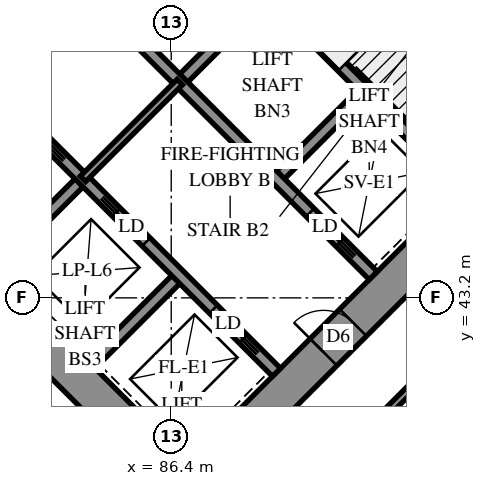
"""IFC4 building model, lengths in metres.
Left out: names, types, materials, properties, quantities, classifications, styles, units other than length and angle.
Written with IfcOpenShell. Run it as: python <this file> out.ifc"""

import sys

from ifc_helpers import new_model, si_unit, direction, frame, frame_2d, origin, place, context, subcontext, project, spatial, polyline, rectangle, outline, extrude, element, fill, save


model = new_model("IFC4")
c1 = context("Model", 3, precision=1e-05, world=origin(), true_north=direction((0.0, 1.0)))
c2 = subcontext(c1, "Body", "Model", "MODEL_VIEW")
j1 = project(units=[si_unit("LENGTHUNIT", "METRE"), si_unit("PLANEANGLEUNIT", "RADIAN")], contexts=[c1])
p1 = place(None, origin())
s1 = spatial("IfcSite", under=j1, at=p1, CompositionType="ELEMENT")
p2 = place(p1, origin())
s2 = spatial("IfcBuilding", under=s1, at=p2, CompositionType="ELEMENT")
p3 = place(p2, frame((0.0, 0.0, 14.4)))
s3 = spatial("IfcBuildingStorey", under=s2, at=p3, CompositionType="ELEMENT", Elevation=14.4)
p4 = place(p3, frame((75.594, 49.443, -0.4), z_axis=(0.0, 0.0, 1.0), x_axis=(0.7071037324, -0.70710983, 0.0)))
e1 = element("IfcWall", 1, at=p4, inside=s3, PredefinedType="SHEAR", context=c2, shape_type="SweptSolid", body=[
    extrude(rectangle(XDim=16.4, YDim=1.0, at=frame_2d((8.2, 0.0))), origin(), (0.0, 0.0, 1.0), 3.5),
])
p5 = place(p3, frame((86.483, 60.333, -0.4), z_axis=(0.0, 0.0, 1.0), x_axis=(0.70710983, -0.7071037324, 0.0)))
e2 = element("IfcWall", 2, at=p5, inside=s3, PredefinedType="SHEAR", context=c2, shape_type="SweptSolid", body=[
    extrude(rectangle(XDim=16.4, YDim=1.0, at=frame_2d((8.2, 0.0))), origin(), (0.0, 0.0, 1.0), 3.5),
])
p6 = place(p5, frame((11.0, 0.0, 0.4)))
e3 = element("IfcOpeningElement", 3, at=p6, cuts=e2, PredefinedType="OPENING", context=c2, shape_type="SweptSolid", body=[
    extrude(rectangle(XDim=0.8, YDim=2.1, at=frame_2d((0.4, 1.05))), frame((0.0, 0.51, 0.0), z_axis=(0.0, -1.0, 0.0), x_axis=(1.0, 0.0, 0.0)), (0.0, 0.0, 1.0), 1.02),
])
p7 = place(p3, frame((76.301, 49.443, -0.4), z_axis=(0.0, 0.0, 1.0), x_axis=(0.7071067812, 0.7071067812, 0.0)))
e4 = element("IfcWall", 4, at=p7, inside=s3, PredefinedType="SHEAR", context=c2, shape_type="SweptSolid", body=[
    extrude(rectangle(XDim=14.4, YDim=1.0, at=frame_2d((7.2, 0.0))), origin(), (0.0, 0.0, 1.0), 3.5),
])
p8 = place(p7, frame((4.55, 0.0, 0.4)))
e5 = element("IfcOpeningElement", 5, at=p8, cuts=e4, PredefinedType="OPENING", context=c2, shape_type="SweptSolid", body=[
    extrude(rectangle(XDim=1.1, YDim=2.1, at=frame_2d((0.55, 1.05))), frame((0.0, 0.51, 0.0), z_axis=(0.0, -1.0, 0.0), x_axis=(1.0, 0.0, 0.0)), (0.0, 0.0, 1.0), 1.02),
])
p9 = place(p7, frame((11.35, 0.0, 0.4)))
e6 = element("IfcOpeningElement", 6, at=p9, cuts=e4, PredefinedType="OPENING", context=c2, shape_type="SweptSolid", body=[
    extrude(rectangle(XDim=1.1, YDim=2.1, at=frame_2d((0.55, 1.05))), frame((0.0, 0.51, 0.0), z_axis=(0.0, -1.0, 0.0), x_axis=(1.0, 0.0, 0.0)), (0.0, 0.0, 1.0), 1.02),
])
p10 = place(p3, frame((87.19, 38.554, -0.4), z_axis=(0.0, 0.0, 1.0), x_axis=(0.707103309, 0.7071102534, 0.0)))
e7 = element("IfcWall", 7, at=p10, inside=s3, PredefinedType="SHEAR", context=c2, shape_type="SweptSolid", body=[
    extrude(rectangle(XDim=14.4, YDim=1.0, at=frame_2d((7.2, 0.0))), origin(), (0.0, 0.0, 1.0), 3.5),
])
p11 = place(p10, frame((4.55, 0.0, 0.4)))
e8 = element("IfcOpeningElement", 8, at=p11, cuts=e7, PredefinedType="OPENING", context=c2, shape_type="SweptSolid", body=[
    extrude(rectangle(XDim=1.1, YDim=2.1, at=frame_2d((0.55, 1.05))), frame((0.0, 0.51, 0.0), z_axis=(0.0, -1.0, 0.0), x_axis=(1.0, 0.0, 0.0)), (0.0, 0.0, 1.0), 1.02),
])
p12 = place(p10, frame((11.35, 0.0, 0.4)))
e9 = element("IfcOpeningElement", 9, at=p12, cuts=e7, PredefinedType="OPENING", context=c2, shape_type="SweptSolid", body=[
    extrude(rectangle(XDim=1.1, YDim=2.1, at=frame_2d((0.55, 1.05))), frame((0.0, 0.51, 0.0), z_axis=(0.0, -1.0, 0.0), x_axis=(1.0, 0.0, 0.0)), (0.0, 0.0, 1.0), 1.02),
])
p13 = place(p3, frame((81.746, 43.999, 0.0), z_axis=(0.0, 0.0, 1.0), x_axis=(0.7071067812, 0.7071067812, 0.0)))
e10 = element("IfcWall", 10, at=p13, inside=s3, PredefinedType="SOLIDWALL", context=c2, shape_type="SweptSolid", body=[
    extrude(rectangle(XDim=3.3, YDim=0.3, at=frame_2d((1.65, 0.0))), origin(), (0.0, 0.0, 1.0), 3.8),
])
p14 = place(p3, frame((86.625, 48.878, 0.0), z_axis=(0.0, 0.0, 1.0), x_axis=(0.7071067812, 0.7071067812, 0.0)))
e11 = element("IfcWall", 11, at=p14, inside=s3, PredefinedType="SOLIDWALL", context=c2, shape_type="SweptSolid", body=[
    extrude(rectangle(XDim=3.3, YDim=0.3, at=frame_2d((1.65, 0.0))), origin(), (0.0, 0.0, 1.0), 3.8),
])
p15 = place(p3, frame((84.291, 41.453, 0.0), z_axis=(0.0, 0.0, 1.0), x_axis=(0.7071067812, 0.7071067812, 0.0)))
e12 = element("IfcWall", 12, at=p15, inside=s3, PredefinedType="SOLIDWALL", context=c2, shape_type="SweptSolid", body=[
    extrude(rectangle(XDim=3.3, YDim=0.3, at=frame_2d((1.65, 0.0))), origin(), (0.0, 0.0, 1.0), 3.8),
])
p16 = place(p3, frame((89.17, 46.332, 0.0), z_axis=(0.0, 0.0, 1.0), x_axis=(0.7071067812, 0.7071067812, 0.0)))
e13 = element("IfcWall", 13, at=p16, inside=s3, PredefinedType="SOLIDWALL", context=c2, shape_type="SweptSolid", body=[
    extrude(rectangle(XDim=3.3, YDim=0.3, at=frame_2d((1.65, 0.0))), origin(), (0.0, 0.0, 1.0), 3.8),
])
p17 = place(p3, frame((78.988, 51.423, 0.0), z_axis=(0.0, 0.0, 1.0), x_axis=(0.7071067812, -0.7071067812, 0.0)))
e14 = element("IfcWall", 14, at=p17, inside=s3, PredefinedType="SOLIDWALL", context=c2, shape_type="SweptSolid", body=[
    extrude(rectangle(XDim=14.4, YDim=0.3, at=frame_2d((7.2, 0.0))), origin(), (0.0, 0.0, 1.0), 3.8),
])
p18 = place(p17, frame((1.25, 0.0, 0.0)))
e15 = element("IfcOpeningElement", 15, at=p18, cuts=e14, PredefinedType="OPENING", context=c2, shape_type="SweptSolid", body=[
    extrude(rectangle(XDim=1.1, YDim=2.1, at=frame_2d((0.55, 1.05))), frame((0.0, 0.16, 0.0), z_axis=(0.0, -1.0, 0.0), x_axis=(1.0, 0.0, 0.0)), (0.0, 0.0, 1.0), 0.32),
])
p19 = place(p17, frame((4.85, 0.0, 0.0)))
e16 = element("IfcOpeningElement", 16, at=p19, cuts=e14, PredefinedType="OPENING", context=c2, shape_type="SweptSolid", body=[
    extrude(rectangle(XDim=1.1, YDim=2.1, at=frame_2d((0.55, 1.05))), frame((0.0, 0.16, 0.0), z_axis=(0.0, -1.0, 0.0), x_axis=(1.0, 0.0, 0.0)), (0.0, 0.0, 1.0), 0.32),
])
p20 = place(p17, frame((8.45, 0.0, 0.0)))
e17 = element("IfcOpeningElement", 17, at=p20, cuts=e14, PredefinedType="OPENING", context=c2, shape_type="SweptSolid", body=[
    extrude(rectangle(XDim=1.1, YDim=2.1, at=frame_2d((0.55, 1.05))), frame((0.0, 0.16, 0.0), z_axis=(0.0, -1.0, 0.0), x_axis=(1.0, 0.0, 0.0)), (0.0, 0.0, 1.0), 0.32),
])
p21 = place(p17, frame((12.05, 0.0, 0.0)))
e18 = element("IfcOpeningElement", 18, at=p21, cuts=e14, PredefinedType="OPENING", context=c2, shape_type="SweptSolid", body=[
    extrude(rectangle(XDim=1.1, YDim=2.1, at=frame_2d((0.55, 1.05))), frame((0.0, 0.16, 0.0), z_axis=(0.0, -1.0, 0.0), x_axis=(1.0, 0.0, 0.0)), (0.0, 0.0, 1.0), 0.32),
])
p22 = place(p3, frame((81.534, 53.969, 0.0), z_axis=(0.0, 0.0, 1.0), x_axis=(0.707103309, -0.7071102534, 0.0)))
e19 = element("IfcWall", 19, at=p22, inside=s3, PredefinedType="SOLIDWALL", context=c2, shape_type="SweptSolid", body=[
    extrude(rectangle(XDim=14.4, YDim=0.3, at=frame_2d((7.2, 0.0))), origin(), (0.0, 0.0, 1.0), 3.8),
])
p23 = place(p22, frame((12.05, 0.0, 0.0)))
e20 = element("IfcOpeningElement", 20, at=p23, cuts=e19, PredefinedType="OPENING", context=c2, shape_type="SweptSolid", body=[
    extrude(rectangle(XDim=1.1, YDim=2.1, at=frame_2d((0.55, 1.05))), frame((0.0, 0.16, 0.0), z_axis=(0.0, -1.0, 0.0), x_axis=(1.0, 0.0, 0.0)), (0.0, 0.0, 1.0), 0.32),
])
p24 = place(p3, frame((88.958, 51.211, 0.0), z_axis=(0.0, 0.0, 1.0), x_axis=(0.7070998367, -0.7071137256, 0.0)))
e21 = element("IfcWall", 21, at=p24, inside=s3, PredefinedType="SOLIDWALL", context=c2, shape_type="SweptSolid", body=[
    extrude(rectangle(XDim=7.2, YDim=0.3, at=frame_2d((3.6, 0.0))), origin(), (0.0, 0.0, 1.0), 3.8),
])
p25 = place(p3, frame((117.843, 34.665, 0.0), z_axis=(0.0, 0.0, 1.0), x_axis=(-0.7071067812, 0.7071067812, 0.0)))
e22 = element("IfcWall", 22, at=p25, inside=s3, PredefinedType="SOLIDWALL", context=c2, shape_type="SweptSolid", body=[
    extrude(outline(polyline([(-0.275, -0.275), (54.222, -0.275), (53.994, 0.275), (0.275, 0.275), (-0.275, -0.275)])), origin(), (0.0, 0.0, 1.0), 3.8),
])
p26 = place(p25, frame((0.8, 0.0, 0.7)))
e23 = element("IfcOpeningElement", 23, at=p26, cuts=e22, PredefinedType="OPENING", context=c2, shape_type="SweptSolid", body=[
    extrude(rectangle(XDim=1.8, YDim=2.6, at=frame_2d((0.9, 1.3))), frame((0.0, 0.285, 0.0), z_axis=(0.0, -1.0, 0.0), x_axis=(1.0, 0.0, 0.0)), (0.0, 0.0, 1.0), 0.57),
])
p27 = place(p25, frame((4.225, 0.0, 0.7)))
e24 = element("IfcOpeningElement", 24, at=p27, cuts=e22, PredefinedType="OPENING", context=c2, shape_type="SweptSolid", body=[
    extrude(rectangle(XDim=1.8, YDim=2.6, at=frame_2d((0.9, 1.3))), frame((0.0, 0.285, 0.0), z_axis=(0.0, -1.0, 0.0), x_axis=(1.0, 0.0, 0.0)), (0.0, 0.0, 1.0), 0.57),
])
p28 = place(p25, frame((7.825, 0.0, 0.7)))
e25 = element("IfcOpeningElement", 25, at=p28, cuts=e22, PredefinedType="OPENING", context=c2, shape_type="SweptSolid", body=[
    extrude(rectangle(XDim=1.8, YDim=2.6, at=frame_2d((0.9, 1.3))), frame((0.0, 0.285, 0.0), z_axis=(0.0, -1.0, 0.0), x_axis=(1.0, 0.0, 0.0)), (0.0, 0.0, 1.0), 0.57),
])
p29 = place(p25, frame((11.425, 0.0, 0.7)))
e26 = element("IfcOpeningElement", 26, at=p29, cuts=e22, PredefinedType="OPENING", context=c2, shape_type="SweptSolid", body=[
    extrude(rectangle(XDim=1.8, YDim=2.6, at=frame_2d((0.9, 1.3))), frame((0.0, 0.285, 0.0), z_axis=(0.0, -1.0, 0.0), x_axis=(1.0, 0.0, 0.0)), (0.0, 0.0, 1.0), 0.57),
])
p30 = place(p25, frame((15.025, 0.0, 0.7)))
e27 = element("IfcOpeningElement", 27, at=p30, cuts=e22, PredefinedType="OPENING", context=c2, shape_type="SweptSolid", body=[
    extrude(rectangle(XDim=1.8, YDim=2.6, at=frame_2d((0.9, 1.3))), frame((0.0, 0.285, 0.0), z_axis=(0.0, -1.0, 0.0), x_axis=(1.0, 0.0, 0.0)), (0.0, 0.0, 1.0), 0.57),
])
p31 = place(p25, frame((18.625, 0.0, 0.7)))
e28 = element("IfcOpeningElement", 28, at=p31, cuts=e22, PredefinedType="OPENING", context=c2, shape_type="SweptSolid", body=[
    extrude(rectangle(XDim=1.8, YDim=2.6, at=frame_2d((0.9, 1.3))), frame((0.0, 0.285, 0.0), z_axis=(0.0, -1.0, 0.0), x_axis=(1.0, 0.0, 0.0)), (0.0, 0.0, 1.0), 0.57),
])
p32 = place(p25, frame((22.225, 0.0, 0.7)))
e29 = element("IfcOpeningElement", 29, at=p32, cuts=e22, PredefinedType="OPENING", context=c2, shape_type="SweptSolid", body=[
    extrude(rectangle(XDim=1.8, YDim=2.6, at=frame_2d((0.9, 1.3))), frame((0.0, 0.285, 0.0), z_axis=(0.0, -1.0, 0.0), x_axis=(1.0, 0.0, 0.0)), (0.0, 0.0, 1.0), 0.57),
])
p33 = place(p25, frame((25.825, 0.0, 0.7)))
e30 = element("IfcOpeningElement", 30, at=p33, cuts=e22, PredefinedType="OPENING", context=c2, shape_type="SweptSolid", body=[
    extrude(rectangle(XDim=1.8, YDim=2.6, at=frame_2d((0.9, 1.3))), frame((0.0, 0.285, 0.0), z_axis=(0.0, -1.0, 0.0), x_axis=(1.0, 0.0, 0.0)), (0.0, 0.0, 1.0), 0.57),
])
p34 = place(p25, frame((29.425, 0.0, 0.7)))
e31 = element("IfcOpeningElement", 31, at=p34, cuts=e22, PredefinedType="OPENING", context=c2, shape_type="SweptSolid", body=[
    extrude(rectangle(XDim=1.8, YDim=2.6, at=frame_2d((0.9, 1.3))), frame((0.0, 0.285, 0.0), z_axis=(0.0, -1.0, 0.0), x_axis=(1.0, 0.0, 0.0)), (0.0, 0.0, 1.0), 0.57),
])
p35 = place(p25, frame((33.025, 0.0, 0.7)))
e32 = element("IfcOpeningElement", 32, at=p35, cuts=e22, PredefinedType="OPENING", context=c2, shape_type="SweptSolid", body=[
    extrude(rectangle(XDim=1.8, YDim=2.6, at=frame_2d((0.9, 1.3))), frame((0.0, 0.285, 0.0), z_axis=(0.0, -1.0, 0.0), x_axis=(1.0, 0.0, 0.0)), (0.0, 0.0, 1.0), 0.57),
])
p36 = place(p25, frame((36.625, 0.0, 0.7)))
e33 = element("IfcOpeningElement", 33, at=p36, cuts=e22, PredefinedType="OPENING", context=c2, shape_type="SweptSolid", body=[
    extrude(rectangle(XDim=1.8, YDim=2.6, at=frame_2d((0.9, 1.3))), frame((0.0, 0.285, 0.0), z_axis=(0.0, -1.0, 0.0), x_axis=(1.0, 0.0, 0.0)), (0.0, 0.0, 1.0), 0.57),
])
p37 = place(p25, frame((40.225, 0.0, 0.7)))
e34 = element("IfcOpeningElement", 34, at=p37, cuts=e22, PredefinedType="OPENING", context=c2, shape_type="SweptSolid", body=[
    extrude(rectangle(XDim=1.8, YDim=2.6, at=frame_2d((0.9, 1.3))), frame((0.0, 0.285, 0.0), z_axis=(0.0, -1.0, 0.0), x_axis=(1.0, 0.0, 0.0)), (0.0, 0.0, 1.0), 0.57),
])
p38 = place(p25, frame((43.825, 0.0, 0.7)))
e35 = element("IfcOpeningElement", 35, at=p38, cuts=e22, PredefinedType="OPENING", context=c2, shape_type="SweptSolid", body=[
    extrude(rectangle(XDim=1.8, YDim=2.6, at=frame_2d((0.9, 1.3))), frame((0.0, 0.285, 0.0), z_axis=(0.0, -1.0, 0.0), x_axis=(1.0, 0.0, 0.0)), (0.0, 0.0, 1.0), 0.57),
])
p39 = place(p25, frame((47.425, 0.0, 0.7)))
e36 = element("IfcOpeningElement", 36, at=p39, cuts=e22, PredefinedType="OPENING", context=c2, shape_type="SweptSolid", body=[
    extrude(rectangle(XDim=1.8, YDim=2.6, at=frame_2d((0.9, 1.3))), frame((0.0, 0.285, 0.0), z_axis=(0.0, -1.0, 0.0), x_axis=(1.0, 0.0, 0.0)), (0.0, 0.0, 1.0), 0.57),
])
p40 = place(p25, frame((51.06, 0.0, 0.7)))
e37 = element("IfcOpeningElement", 37, at=p40, cuts=e22, PredefinedType="OPENING", context=c2, shape_type="SweptSolid", body=[
    extrude(rectangle(XDim=1.8, YDim=2.6, at=frame_2d((0.9, 1.3))), frame((0.0, 0.285, 0.0), z_axis=(0.0, -1.0, 0.0), x_axis=(1.0, 0.0, 0.0)), (0.0, 0.0, 1.0), 0.57),
])
p41 = place(p3, frame((77.07, 42.275, 0.0), z_axis=(0.0, 0.0, 1.0), x_axis=(0.7071067812, -0.7071067812, 0.0)))
e38 = element("IfcWall", 38, at=p41, inside=s3, PredefinedType="SOLIDWALL", context=c2, shape_type="SweptSolid", body=[
    extrude(outline(polyline([(0.114, -0.275), (39.288, -0.275), (38.737, 0.275), (-0.114, 0.275), (0.114, -0.275)])), origin(), (0.0, 0.0, 1.0), 3.8),
])
p42 = place(p41, frame((2.837, 0.0, 0.7)))
e39 = element("IfcOpeningElement", 39, at=p42, cuts=e38, PredefinedType="OPENING", context=c2, shape_type="SweptSolid", body=[
    extrude(rectangle(XDim=1.8, YDim=2.6, at=frame_2d((0.9, 1.3))), frame((0.0, 0.285, 0.0), z_axis=(0.0, -1.0, 0.0), x_axis=(1.0, 0.0, 0.0)), (0.0, 0.0, 1.0), 0.57),
])
p43 = place(p41, frame((6.588, 0.0, 0.7)))
e40 = element("IfcOpeningElement", 40, at=p43, cuts=e38, PredefinedType="OPENING", context=c2, shape_type="SweptSolid", body=[
    extrude(rectangle(XDim=1.8, YDim=2.6, at=frame_2d((0.9, 1.3))), frame((0.0, 0.285, 0.0), z_axis=(0.0, -1.0, 0.0), x_axis=(1.0, 0.0, 0.0)), (0.0, 0.0, 1.0), 0.57),
])
p44 = place(p41, frame((10.188, 0.0, 0.7)))
e41 = element("IfcOpeningElement", 41, at=p44, cuts=e38, PredefinedType="OPENING", context=c2, shape_type="SweptSolid", body=[
    extrude(rectangle(XDim=1.8, YDim=2.6, at=frame_2d((0.9, 1.3))), frame((0.0, 0.285, 0.0), z_axis=(0.0, -1.0, 0.0), x_axis=(1.0, 0.0, 0.0)), (0.0, 0.0, 1.0), 0.57),
])
p45 = place(p41, frame((13.787, 0.0, 0.7)))
e42 = element("IfcOpeningElement", 42, at=p45, cuts=e38, PredefinedType="OPENING", context=c2, shape_type="SweptSolid", body=[
    extrude(rectangle(XDim=1.8, YDim=2.6, at=frame_2d((0.9, 1.3))), frame((0.0, 0.285, 0.0), z_axis=(0.0, -1.0, 0.0), x_axis=(1.0, 0.0, 0.0)), (0.0, 0.0, 1.0), 0.57),
])
p46 = place(p41, frame((17.387, 0.0, 0.7)))
e43 = element("IfcOpeningElement", 43, at=p46, cuts=e38, PredefinedType="OPENING", context=c2, shape_type="SweptSolid", body=[
    extrude(rectangle(XDim=1.8, YDim=2.6, at=frame_2d((0.9, 1.3))), frame((0.0, 0.285, 0.0), z_axis=(0.0, -1.0, 0.0), x_axis=(1.0, 0.0, 0.0)), (0.0, 0.0, 1.0), 0.57),
])
p47 = place(p41, frame((20.988, 0.0, 0.7)))
e44 = element("IfcOpeningElement", 44, at=p47, cuts=e38, PredefinedType="OPENING", context=c2, shape_type="SweptSolid", body=[
    extrude(rectangle(XDim=1.8, YDim=2.6, at=frame_2d((0.9, 1.3))), frame((0.0, 0.285, 0.0), z_axis=(0.0, -1.0, 0.0), x_axis=(1.0, 0.0, 0.0)), (0.0, 0.0, 1.0), 0.57),
])
p48 = place(p41, frame((24.587, 0.0, 0.7)))
e45 = element("IfcOpeningElement", 45, at=p48, cuts=e38, PredefinedType="OPENING", context=c2, shape_type="SweptSolid", body=[
    extrude(rectangle(XDim=1.8, YDim=2.6, at=frame_2d((0.9, 1.3))), frame((0.0, 0.285, 0.0), z_axis=(0.0, -1.0, 0.0), x_axis=(1.0, 0.0, 0.0)), (0.0, 0.0, 1.0), 0.57),
])
p49 = place(p41, frame((28.188, 0.0, 0.7)))
e46 = element("IfcOpeningElement", 46, at=p49, cuts=e38, PredefinedType="OPENING", context=c2, shape_type="SweptSolid", body=[
    extrude(rectangle(XDim=1.8, YDim=2.6, at=frame_2d((0.9, 1.3))), frame((0.0, 0.285, 0.0), z_axis=(0.0, -1.0, 0.0), x_axis=(1.0, 0.0, 0.0)), (0.0, 0.0, 1.0), 0.57),
])
p50 = place(p41, frame((31.788, 0.0, 0.7)))
e47 = element("IfcOpeningElement", 47, at=p50, cuts=e38, PredefinedType="OPENING", context=c2, shape_type="SweptSolid", body=[
    extrude(rectangle(XDim=1.8, YDim=2.6, at=frame_2d((0.9, 1.3))), frame((0.0, 0.285, 0.0), z_axis=(0.0, -1.0, 0.0), x_axis=(1.0, 0.0, 0.0)), (0.0, 0.0, 1.0), 0.57),
])
p51 = place(p41, frame((35.388, 0.0, 0.7)))
e48 = element("IfcOpeningElement", 48, at=p51, cuts=e38, PredefinedType="OPENING", context=c2, shape_type="SweptSolid", body=[
    extrude(rectangle(XDim=1.8, YDim=2.6, at=frame_2d((0.9, 1.3))), frame((0.0, 0.285, 0.0), z_axis=(0.0, -1.0, 0.0), x_axis=(1.0, 0.0, 0.0)), (0.0, 0.0, 1.0), 0.57),
])
p52 = place(p3, frame((91.313, 53.354, 0.0), z_axis=(0.0, 0.0, 1.0), x_axis=(0.7071067812, -0.7071067812, 0.0)))
e49 = element("IfcWall", 49, at=p52, inside=s3, PredefinedType="PARTITIONING", context=c2, shape_type="SweptSolid", body=[
    extrude(rectangle(XDim=5.65, YDim=0.15, at=frame_2d((2.825, 0.0))), origin(), (0.0, 0.0, 1.0), 3.8),
])
p53 = place(p3, frame((84.079, 46.332, 0.0), z_axis=(0.0, 0.0, 1.0), x_axis=(0.7071067812, 0.7071067812, 0.0)))
e50 = element("IfcWall", 50, at=p53, inside=s3, PredefinedType="PARTITIONING", context=c2, shape_type="SweptSolid", body=[
    extrude(rectangle(XDim=3.6, YDim=0.2, at=frame_2d((1.8, 0.0))), origin(), (0.0, 0.0, 1.0), 3.8),
])
p54 = place(p3, frame((86.376, 33.357, 0.0), z_axis=(0.0, 0.0, 1.0), x_axis=(0.7071020419, 0.7071115204, 0.0)))
e51 = element("IfcWall", 51, at=p54, inside=s3, PredefinedType="PARTITIONING", context=c2, shape_type="SweptSolid", body=[
    extrude(rectangle(XDim=10.55, YDim=0.2, at=frame_2d((5.275, 0.0))), origin(), (0.0, 0.0, 1.0), 3.8),
])
p55 = place(p3, frame((86.836, 34.948, 0.0), z_axis=(0.0, 0.0, 1.0), x_axis=(0.7071067812, 0.7071067812, 0.0)))
e52 = element("IfcWall", 52, at=p55, inside=s3, PredefinedType="PARTITIONING", context=c2, shape_type="SweptSolid", body=[
    extrude(rectangle(XDim=9.099, YDim=0.2, at=frame_2d((4.55, 0.0))), origin(), (0.0, 0.0, 1.0), 3.8),
])
p56 = place(p11, origin())
e53 = element("IfcDoor", 53, at=p56, inside=s3, OperationType="DOUBLE_DOOR_SINGLE_SWING", PredefinedType="DOOR", context=c2, shape_type="SweptSolid", body=[
    extrude(rectangle(XDim=1.1, YDim=2.1, at=frame_2d((0.55, 1.05))), frame((0.0, 0.025, 0.0), z_axis=(0.0, -1.0, 0.0), x_axis=(1.0, 0.0, 0.0)), (0.0, 0.0, 1.0), 0.05),
])
fill(e8, e53)
p57 = place(p20, origin())
e54 = element("IfcDoor", 54, at=p57, inside=s3, OperationType="SLIDING_TO_LEFT", PredefinedType="DOOR", context=c2, shape_type="SweptSolid", body=[
    extrude(rectangle(XDim=1.1, YDim=2.1, at=frame_2d((0.55, 1.05))), frame((0.0, 0.025, 0.0), z_axis=(0.0, -1.0, 0.0), x_axis=(1.0, 0.0, 0.0)), (0.0, 0.0, 1.0), 0.05),
])
fill(e17, e54)
p58 = place(p21, origin())
e55 = element("IfcDoor", 55, at=p58, inside=s3, OperationType="SLIDING_TO_RIGHT", PredefinedType="DOOR", context=c2, shape_type="SweptSolid", body=[
    extrude(rectangle(XDim=1.1, YDim=2.1, at=frame_2d((0.55, 1.05))), frame((0.0, 0.025, 0.0), z_axis=(0.0, -1.0, 0.0), x_axis=(1.0, 0.0, 0.0)), (0.0, 0.0, 1.0), 0.05),
])
fill(e18, e55)
p59 = place(p23, origin())
e56 = element("IfcDoor", 56, at=p59, inside=s3, OperationType="SLIDING_TO_RIGHT", PredefinedType="DOOR", context=c2, shape_type="SweptSolid", body=[
    extrude(rectangle(XDim=1.1, YDim=2.1, at=frame_2d((0.55, 1.05))), frame((0.0, 0.025, 0.0), z_axis=(0.0, -1.0, 0.0), x_axis=(1.0, 0.0, 0.0)), (0.0, 0.0, 1.0), 0.05),
])
fill(e20, e56)
save(model, sys.argv[1])
